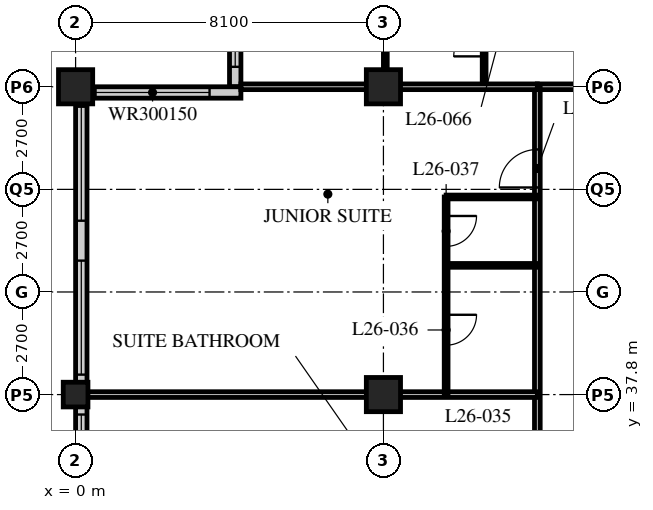
"""IFC4 building model, lengths in metres.
Left out: names, types, materials, properties, quantities, classifications, styles, units other than length and angle.
Written with IfcOpenShell. Run it as: python <this file> out.ifc"""

import sys

from ifc_helpers import new_model, si_unit, direction, frame, frame_2d, origin, origin_2d, place, context, subcontext, project, spatial, rectangle, hollow_rectangle, extrude, element, fill, save


model = new_model("IFC4")
c1 = context("Model", 3, precision=1e-05, world=origin(), true_north=direction((0.0, 1.0)))
c2 = subcontext(c1, "Body", "Model", "MODEL_VIEW")
j1 = project(units=[si_unit("LENGTHUNIT", "METRE"), si_unit("PLANEANGLEUNIT", "RADIAN")], contexts=[c1])
p1 = place(None, origin())
s1 = spatial("IfcSite", under=j1, at=p1, CompositionType="ELEMENT")
p2 = place(p1, origin())
s2 = spatial("IfcBuilding", under=s1, at=p2, CompositionType="ELEMENT")
p3 = place(p2, frame((0.0, 0.0, 106.8)))
s3 = spatial("IfcBuildingStorey", under=s2, at=p3, CompositionType="ELEMENT", Elevation=106.8)
p4 = place(p3, frame((0.0, 37.8, 0.0), z_axis=(0.0, 0.0, 1.0), x_axis=(1.0, 0.0, 0.0)))
e1 = element("IfcColumn", 1, at=p4, inside=s3, PredefinedType="COLUMN", context=c2, shape_type="SweptSolid", body=[
    extrude(hollow_rectangle(XDim=0.65, YDim=0.65, WallThickness=0.055, at=origin_2d()), origin(), (0.0, 0.0, 1.0), 3.4),
])
for number, where, z_axis, x_axis in (
    (2, (0.0, 45.9, 0.0), (0.0, 0.0, 1.0), (1.0, 0.0, 0.0)),
    (3, (8.1, 37.8, 0.0), (0.0, 0.0, 1.0), (1.0, 0.0, 0.0)),
    (4, (8.1, 45.9, 0.0), (0.0, 0.0, 1.0), (1.0, 0.0, 0.0)),
):
    element("IfcColumn", number, at=place(p3, frame(where, z_axis=z_axis, x_axis=x_axis)), inside=s3, PredefinedType="COLUMN", context=c2, shape_type="SweptSolid", body=[
        extrude(hollow_rectangle(XDim=0.9, YDim=0.9, WallThickness=0.09, at=origin_2d()), origin(), (0.0, 0.0, 1.0), 3.4),
    ])
p5 = place(p3, frame((4.2, 49.65, 0.0), z_axis=(0.0, 0.0, 1.0), x_axis=(0.0, -1.0, 0.0)))
e5 = element("IfcWall", 5, at=p5, inside=s3, PredefinedType="SOLIDWALL", context=c2, shape_type="SweptSolid", body=[
    extrude(rectangle(XDim=3.75, YDim=0.3, at=frame_2d((1.875, 0.0))), origin(), (0.0, 0.0, 1.0), 3.19),
])
p6 = place(p5, frame((0.225, 0.0, 0.9)))
e6 = element("IfcOpeningElement", 6, at=p6, cuts=e5, PredefinedType="OPENING", context=c2, shape_type="SweptSolid", body=[
    extrude(rectangle(XDim=3.0, YDim=1.5, at=frame_2d((1.5, 0.75))), frame((0.0, 0.16, 0.0), z_axis=(0.0, -1.0, 0.0), x_axis=(1.0, 0.0, 0.0)), (0.0, 0.0, 1.0), 0.32),
])
p7 = place(p3, frame((4.35, 45.75, 0.0), z_axis=(0.0, 0.0, 1.0), x_axis=(-1.0, 0.0, 0.0)))
e7 = element("IfcWall", 7, at=p7, inside=s3, PredefinedType="SOLIDWALL", context=c2, shape_type="SweptSolid", body=[
    extrude(rectangle(XDim=4.35, YDim=0.3, at=frame_2d((2.175, 0.0))), origin(), (0.0, 0.0, 1.0), 3.19),
])
p8 = place(p7, frame((0.825, 0.0, 0.9)))
e8 = element("IfcOpeningElement", 8, at=p8, cuts=e7, PredefinedType="OPENING", context=c2, shape_type="SweptSolid", body=[
    extrude(rectangle(XDim=3.0, YDim=1.5, at=frame_2d((1.5, 0.75))), frame((0.0, 0.16, 0.0), z_axis=(0.0, -1.0, 0.0), x_axis=(1.0, 0.0, 0.0)), (0.0, 0.0, 1.0), 0.32),
])
p9 = place(p3, frame((0.15, 45.6, 0.0), z_axis=(0.0, 0.0, 1.0), x_axis=(0.0, -1.0, 0.0)))
e9 = element("IfcWall", 9, at=p9, inside=s3, PredefinedType="SOLIDWALL", context=c2, shape_type="SweptSolid", body=[
    extrude(rectangle(XDim=32.1, YDim=0.3, at=frame_2d((16.05, 0.0))), origin(), (0.0, 0.0, 1.0), 3.19),
])
p10 = place(p9, frame((0.225, 0.0, 0.9)))
e10 = element("IfcOpeningElement", 10, at=p10, cuts=e9, PredefinedType="OPENING", context=c2, shape_type="SweptSolid", body=[
    extrude(rectangle(XDim=3.0, YDim=2.0, at=frame_2d((1.5, 1.0))), frame((0.0, 0.16, 0.0), z_axis=(0.0, -1.0, 0.0), x_axis=(1.0, 0.0, 0.0)), (0.0, 0.0, 1.0), 0.32),
])
p11 = place(p9, frame((4.275, 0.0, 0.9)))
e11 = element("IfcOpeningElement", 11, at=p11, cuts=e9, PredefinedType="OPENING", context=c2, shape_type="SweptSolid", body=[
    extrude(rectangle(XDim=3.0, YDim=2.0, at=frame_2d((1.5, 1.0))), frame((0.0, 0.16, 0.0), z_axis=(0.0, -1.0, 0.0), x_axis=(1.0, 0.0, 0.0)), (0.0, 0.0, 1.0), 0.32),
])
p12 = place(p9, frame((8.325, 0.0, 0.9)))
e12 = element("IfcOpeningElement", 12, at=p12, cuts=e9, PredefinedType="OPENING", context=c2, shape_type="SweptSolid", body=[
    extrude(rectangle(XDim=3.0, YDim=2.0, at=frame_2d((1.5, 1.0))), frame((0.0, 0.16, 0.0), z_axis=(0.0, -1.0, 0.0), x_axis=(1.0, 0.0, 0.0)), (0.0, 0.0, 1.0), 0.32),
])
p13 = place(p9, frame((12.375, 0.0, 0.9)))
e13 = element("IfcOpeningElement", 13, at=p13, cuts=e9, PredefinedType="OPENING", context=c2, shape_type="SweptSolid", body=[
    extrude(rectangle(XDim=3.0, YDim=2.0, at=frame_2d((1.5, 1.0))), frame((0.0, 0.16, 0.0), z_axis=(0.0, -1.0, 0.0), x_axis=(1.0, 0.0, 0.0)), (0.0, 0.0, 1.0), 0.32),
])
p14 = place(p9, frame((16.425, 0.0, 0.9)))
e14 = element("IfcOpeningElement", 14, at=p14, cuts=e9, PredefinedType="OPENING", context=c2, shape_type="SweptSolid", body=[
    extrude(rectangle(XDim=3.0, YDim=2.0, at=frame_2d((1.5, 1.0))), frame((0.0, 0.16, 0.0), z_axis=(0.0, -1.0, 0.0), x_axis=(1.0, 0.0, 0.0)), (0.0, 0.0, 1.0), 0.32),
])
p15 = place(p9, frame((20.475, 0.0, 0.9)))
e15 = element("IfcOpeningElement", 15, at=p15, cuts=e9, PredefinedType="OPENING", context=c2, shape_type="SweptSolid", body=[
    extrude(rectangle(XDim=3.0, YDim=2.0, at=frame_2d((1.5, 1.0))), frame((0.0, 0.16, 0.0), z_axis=(0.0, -1.0, 0.0), x_axis=(1.0, 0.0, 0.0)), (0.0, 0.0, 1.0), 0.32),
])
p16 = place(p9, frame((24.525, 0.0, 0.9)))
e16 = element("IfcOpeningElement", 16, at=p16, cuts=e9, PredefinedType="OPENING", context=c2, shape_type="SweptSolid", body=[
    extrude(rectangle(XDim=3.0, YDim=2.0, at=frame_2d((1.5, 1.0))), frame((0.0, 0.16, 0.0), z_axis=(0.0, -1.0, 0.0), x_axis=(1.0, 0.0, 0.0)), (0.0, 0.0, 1.0), 0.32),
])
p17 = place(p9, frame((28.575, 0.0, 0.9)))
e17 = element("IfcOpeningElement", 17, at=p17, cuts=e9, PredefinedType="OPENING", context=c2, shape_type="SweptSolid", body=[
    extrude(rectangle(XDim=3.0, YDim=2.0, at=frame_2d((1.5, 1.0))), frame((0.0, 0.16, 0.0), z_axis=(0.0, -1.0, 0.0), x_axis=(1.0, 0.0, 0.0)), (0.0, 0.0, 1.0), 0.32),
])
p18 = place(p3, frame((12.15, 45.9, 0.0), z_axis=(0.0, 0.0, 1.0), x_axis=(1.0, 0.0, 0.0)))
e18 = element("IfcWall", 18, at=p18, inside=s3, PredefinedType="PARTITIONING", context=c2, shape_type="SweptSolid", body=[
    extrude(rectangle(XDim=32.4, YDim=0.15, at=frame_2d((16.2, 0.0))), origin(), (0.0, 0.0, 1.0), 2.578),
])
p19 = place(p18, frame((9.5, 0.0, 0.0)))
e19 = element("IfcOpeningElement", 19, at=p19, cuts=e18, PredefinedType="OPENING", context=c2, shape_type="SweptSolid", body=[
    extrude(rectangle(XDim=1.0, YDim=2.1, at=frame_2d((0.5, 1.05))), frame((0.0, 0.085, 0.0), z_axis=(0.0, -1.0, 0.0), x_axis=(1.0, 0.0, 0.0)), (0.0, 0.0, 1.0), 0.17),
])
p20 = place(p18, frame((17.6, 0.0, 0.0)))
e20 = element("IfcOpeningElement", 20, at=p20, cuts=e18, PredefinedType="OPENING", context=c2, shape_type="SweptSolid", body=[
    extrude(rectangle(XDim=1.0, YDim=2.1, at=frame_2d((0.5, 1.05))), frame((0.0, 0.085, 0.0), z_axis=(0.0, -1.0, 0.0), x_axis=(1.0, 0.0, 0.0)), (0.0, 0.0, 1.0), 0.17),
])
p21 = place(p18, frame((25.7, 0.0, 0.0)))
e21 = element("IfcOpeningElement", 21, at=p21, cuts=e18, PredefinedType="OPENING", context=c2, shape_type="SweptSolid", body=[
    extrude(rectangle(XDim=1.0, YDim=2.1, at=frame_2d((0.5, 1.05))), frame((0.0, 0.085, 0.0), z_axis=(0.0, -1.0, 0.0), x_axis=(1.0, 0.0, 0.0)), (0.0, 0.0, 1.0), 0.17),
])
p22 = place(p18, frame((29.875, 0.0, 0.0)))
e22 = element("IfcOpeningElement", 22, at=p22, cuts=e18, PredefinedType="OPENING", context=c2, shape_type="SweptSolid", body=[
    extrude(rectangle(XDim=1.0, YDim=2.1, at=frame_2d((0.5, 1.05))), frame((0.0, 0.085, 0.0), z_axis=(0.0, -1.0, 0.0), x_axis=(1.0, 0.0, 0.0)), (0.0, 0.0, 1.0), 0.17),
])
p23 = place(p18, frame((1.525, 0.0, 0.0)))
e23 = element("IfcOpeningElement", 23, at=p23, cuts=e18, PredefinedType="OPENING", context=c2, shape_type="SweptSolid", body=[
    extrude(rectangle(XDim=1.0, YDim=2.1, at=frame_2d((0.5, 1.05))), frame((0.0, 0.085, 0.0), z_axis=(0.0, -1.0, 0.0), x_axis=(1.0, 0.0, 0.0)), (0.0, 0.0, 1.0), 0.17),
])
p24 = place(p3, frame((12.15, 21.6, 0.0), z_axis=(0.0, 0.0, 1.0), x_axis=(0.0, 1.0, 0.0)))
e24 = element("IfcWall", 24, at=p24, inside=s3, PredefinedType="PARTITIONING", context=c2, shape_type="SweptSolid", body=[
    extrude(rectangle(XDim=24.3, YDim=0.15, at=frame_2d((12.15, 0.0))), origin(), (0.0, 0.0, 1.0), 3.19),
])
p25 = place(p24, frame((5.45, 0.0, 0.0)))
e25 = element("IfcOpeningElement", 25, at=p25, cuts=e24, PredefinedType="OPENING", context=c2, shape_type="SweptSolid", body=[
    extrude(rectangle(XDim=1.0, YDim=2.1, at=frame_2d((0.5, 1.05))), frame((0.0, 0.085, 0.0), z_axis=(0.0, -1.0, 0.0), x_axis=(1.0, 0.0, 0.0)), (0.0, 0.0, 1.0), 0.17),
])
p26 = place(p24, frame((13.55, 0.0, 0.0)))
e26 = element("IfcOpeningElement", 26, at=p26, cuts=e24, PredefinedType="OPENING", context=c2, shape_type="SweptSolid", body=[
    extrude(rectangle(XDim=1.0, YDim=2.1, at=frame_2d((0.5, 1.05))), frame((0.0, 0.085, 0.0), z_axis=(0.0, -1.0, 0.0), x_axis=(1.0, 0.0, 0.0)), (0.0, 0.0, 1.0), 0.17),
])
p27 = place(p24, frame((21.65, 0.0, 0.0)))
e27 = element("IfcOpeningElement", 27, at=p27, cuts=e24, PredefinedType="OPENING", context=c2, shape_type="SweptSolid", body=[
    extrude(rectangle(XDim=1.0, YDim=2.1, at=frame_2d((0.5, 1.05))), frame((0.0, 0.085, 0.0), z_axis=(0.0, -1.0, 0.0), x_axis=(1.0, 0.0, 0.0)), (0.0, 0.0, 1.0), 0.17),
])
p28 = place(p3, frame((12.15, 37.8, 0.0), z_axis=(0.0, 0.0, 1.0), x_axis=(-1.0, 0.0, 0.0)))
e28 = element("IfcWall", 28, at=p28, inside=s3, PredefinedType="PARTITIONING", context=c2, shape_type="SweptSolid", body=[
    extrude(rectangle(XDim=11.85, YDim=0.15, at=frame_2d((5.925, 0.0))), origin(), (0.0, 0.0, 1.0), 2.578),
])
p29 = place(p3, frame((9.75, 37.8, 0.0), z_axis=(0.0, 0.0, 1.0), x_axis=(0.0, 1.0, 0.0)))
e29 = element("IfcWall", 29, at=p29, inside=s3, PredefinedType="PARTITIONING", context=c2, shape_type="SweptSolid", body=[
    extrude(rectangle(XDim=5.2, YDim=0.1, at=frame_2d((2.6, 0.0))), origin(), (0.0, 0.0, 1.0), 3.19),
])
p30 = place(p29, frame((1.3, 0.0, 0.0)))
e30 = element("IfcOpeningElement", 30, at=p30, cuts=e29, PredefinedType="OPENING", context=c2, shape_type="SweptSolid", body=[
    extrude(rectangle(XDim=0.8, YDim=2.1, at=frame_2d((0.4, 1.05))), frame((0.0, 0.06, 0.0), z_axis=(0.0, -1.0, 0.0), x_axis=(1.0, 0.0, 0.0)), (0.0, 0.0, 1.0), 0.12),
])
p31 = place(p29, frame((3.9, 0.0, 0.0)))
e31 = element("IfcOpeningElement", 31, at=p31, cuts=e29, PredefinedType="OPENING", context=c2, shape_type="SweptSolid", body=[
    extrude(rectangle(XDim=0.8, YDim=2.1, at=frame_2d((0.4, 1.05))), frame((0.0, 0.06, 0.0), z_axis=(0.0, -1.0, 0.0), x_axis=(1.0, 0.0, 0.0)), (0.0, 0.0, 1.0), 0.12),
])
for number, where, z_axis, x_axis in (
    (32, (12.15, 41.2, 0.0), (0.0, 0.0, 1.0), (-1.0, 0.0, 0.0)),
    (33, (12.15, 43.0, 0.0), (0.0, 0.0, 1.0), (-1.0, 0.0, 0.0)),
):
    element("IfcWall", number, at=place(p3, frame(where, z_axis=z_axis, x_axis=x_axis)), inside=s3, PredefinedType="PARTITIONING", context=c2, shape_type="SweptSolid", body=[
        extrude(rectangle(XDim=2.4, YDim=0.1, at=frame_2d((1.2, 0.0))), origin(), (0.0, 0.0, 1.0), 3.19),
    ])
p32 = place(p3, frame((10.75, 45.9, 0.0), z_axis=(0.0, 0.0, 1.0), x_axis=(0.0, 1.0, 0.0)))
e34 = element("IfcWall", 34, at=p32, inside=s3, PredefinedType="PARTITIONING", context=c2, shape_type="SweptSolid", body=[
    extrude(rectangle(XDim=2.4, YDim=0.1, at=frame_2d((1.2, 0.0))), origin(), (0.0, 0.0, 1.0), 3.19),
])
p33 = place(p32, frame((0.8, 0.0, 0.0)))
e35 = element("IfcOpeningElement", 35, at=p33, cuts=e34, PredefinedType="OPENING", context=c2, shape_type="SweptSolid", body=[
    extrude(rectangle(XDim=0.8, YDim=2.1, at=frame_2d((0.4, 1.05))), frame((0.0, 0.06, 0.0), z_axis=(0.0, -1.0, 0.0), x_axis=(1.0, 0.0, 0.0)), (0.0, 0.0, 1.0), 0.12),
])
p34 = place(p3, frame((8.15, 45.9, 0.0), z_axis=(0.0, 0.0, 1.0), x_axis=(0.0, 1.0, 0.0)))
e36 = element("IfcWall", 36, at=p34, inside=s3, PredefinedType="PARTITIONING", context=c2, shape_type="SweptSolid", body=[
    extrude(rectangle(XDim=2.4, YDim=0.1, at=frame_2d((1.2, 0.0))), origin(), (0.0, 0.0, 1.0), 2.578),
])
p35 = place(p3, frame((4.35, 45.9, 0.0), z_axis=(0.0, 0.0, 1.0), x_axis=(1.0, 0.0, 0.0)))
e37 = element("IfcWall", 37, at=p35, inside=s3, PredefinedType="PARTITIONING", context=c2, shape_type="SweptSolid", body=[
    extrude(rectangle(XDim=7.8, YDim=0.15, at=frame_2d((3.9, 0.0))), origin(), (0.0, 0.0, 1.0), 2.578),
])
p36 = place(p6, origin())
e38 = element("IfcWindow", 38, at=p36, inside=s3, PartitioningType="SINGLE_PANEL", PredefinedType="WINDOW", context=c2, shape_type="SweptSolid", body=[
    extrude(rectangle(XDim=3.0, YDim=1.5, at=frame_2d((1.5, 0.75))), frame((0.0, 0.03, 0.0), z_axis=(0.0, -1.0, 0.0), x_axis=(1.0, 0.0, 0.0)), (0.0, 0.0, 1.0), 0.06),
])
fill(e6, e38)
p37 = place(p8, origin())
e39 = element("IfcWindow", 39, at=p37, inside=s3, PartitioningType="SINGLE_PANEL", PredefinedType="WINDOW", context=c2, shape_type="SweptSolid", body=[
    extrude(rectangle(XDim=3.0, YDim=1.5, at=frame_2d((1.5, 0.75))), frame((0.0, 0.03, 0.0), z_axis=(0.0, -1.0, 0.0), x_axis=(1.0, 0.0, 0.0)), (0.0, 0.0, 1.0), 0.06),
])
fill(e8, e39)
p38 = place(p10, origin())
e40 = element("IfcWindow", 40, at=p38, inside=s3, PartitioningType="SINGLE_PANEL", PredefinedType="WINDOW", context=c2, shape_type="SweptSolid", body=[
    extrude(rectangle(XDim=3.0, YDim=2.0, at=frame_2d((1.5, 1.0))), frame((0.0, 0.03, 0.0), z_axis=(0.0, -1.0, 0.0), x_axis=(1.0, 0.0, 0.0)), (0.0, 0.0, 1.0), 0.06),
])
fill(e10, e40)
p39 = place(p11, origin())
e41 = element("IfcWindow", 41, at=p39, inside=s3, PartitioningType="SINGLE_PANEL", PredefinedType="WINDOW", context=c2, shape_type="SweptSolid", body=[
    extrude(rectangle(XDim=3.0, YDim=2.0, at=frame_2d((1.5, 1.0))), frame((0.0, 0.03, 0.0), z_axis=(0.0, -1.0, 0.0), x_axis=(1.0, 0.0, 0.0)), (0.0, 0.0, 1.0), 0.06),
])
fill(e11, e41)
p40 = place(p12, origin())
e42 = element("IfcWindow", 42, at=p40, inside=s3, PartitioningType="SINGLE_PANEL", PredefinedType="WINDOW", context=c2, shape_type="SweptSolid", body=[
    extrude(rectangle(XDim=3.0, YDim=2.0, at=frame_2d((1.5, 1.0))), frame((0.0, 0.03, 0.0), z_axis=(0.0, -1.0, 0.0), x_axis=(1.0, 0.0, 0.0)), (0.0, 0.0, 1.0), 0.06),
])
fill(e12, e42)
p41 = place(p30, origin())
e43 = element("IfcDoor", 43, at=p41, inside=s3, OperationType="SINGLE_SWING_LEFT", PredefinedType="DOOR", context=c2, shape_type="SweptSolid", body=[
    extrude(rectangle(XDim=0.8, YDim=2.1, at=frame_2d((0.4, 1.05))), frame((0.0, 0.025, 0.0), z_axis=(0.0, -1.0, 0.0), x_axis=(1.0, 0.0, 0.0)), (0.0, 0.0, 1.0), 0.05),
])
fill(e30, e43)
p42 = place(p31, origin())
e44 = element("IfcDoor", 44, at=p42, inside=s3, OperationType="SINGLE_SWING_LEFT", PredefinedType="DOOR", context=c2, shape_type="SweptSolid", body=[
    extrude(rectangle(XDim=0.8, YDim=2.1, at=frame_2d((0.4, 1.05))), frame((0.0, 0.025, 0.0), z_axis=(0.0, -1.0, 0.0), x_axis=(1.0, 0.0, 0.0)), (0.0, 0.0, 1.0), 0.05),
])
fill(e31, e44)
p43 = place(p27, origin())
e45 = element("IfcDoor", 45, at=p43, inside=s3, OperationType="SINGLE_SWING_LEFT", PredefinedType="DOOR", context=c2, shape_type="SweptSolid", body=[
    extrude(rectangle(XDim=1.0, YDim=2.1, at=frame_2d((0.5, 1.05))), frame((0.0, 0.025, 0.0), z_axis=(0.0, -1.0, 0.0), x_axis=(1.0, 0.0, 0.0)), (0.0, 0.0, 1.0), 0.05),
])
fill(e27, e45)
p44 = place(p33, origin())
e46 = element("IfcDoor", 46, at=p44, inside=s3, OperationType="SINGLE_SWING_LEFT", PredefinedType="DOOR", context=c2, shape_type="SweptSolid", body=[
    extrude(rectangle(XDim=0.8, YDim=2.1, at=frame_2d((0.4, 1.05))), frame((0.0, 0.025, 0.0), z_axis=(0.0, -1.0, 0.0), x_axis=(1.0, 0.0, 0.0)), (0.0, 0.0, 1.0), 0.05),
])
fill(e35, e46)
save(model, sys.argv[1])
